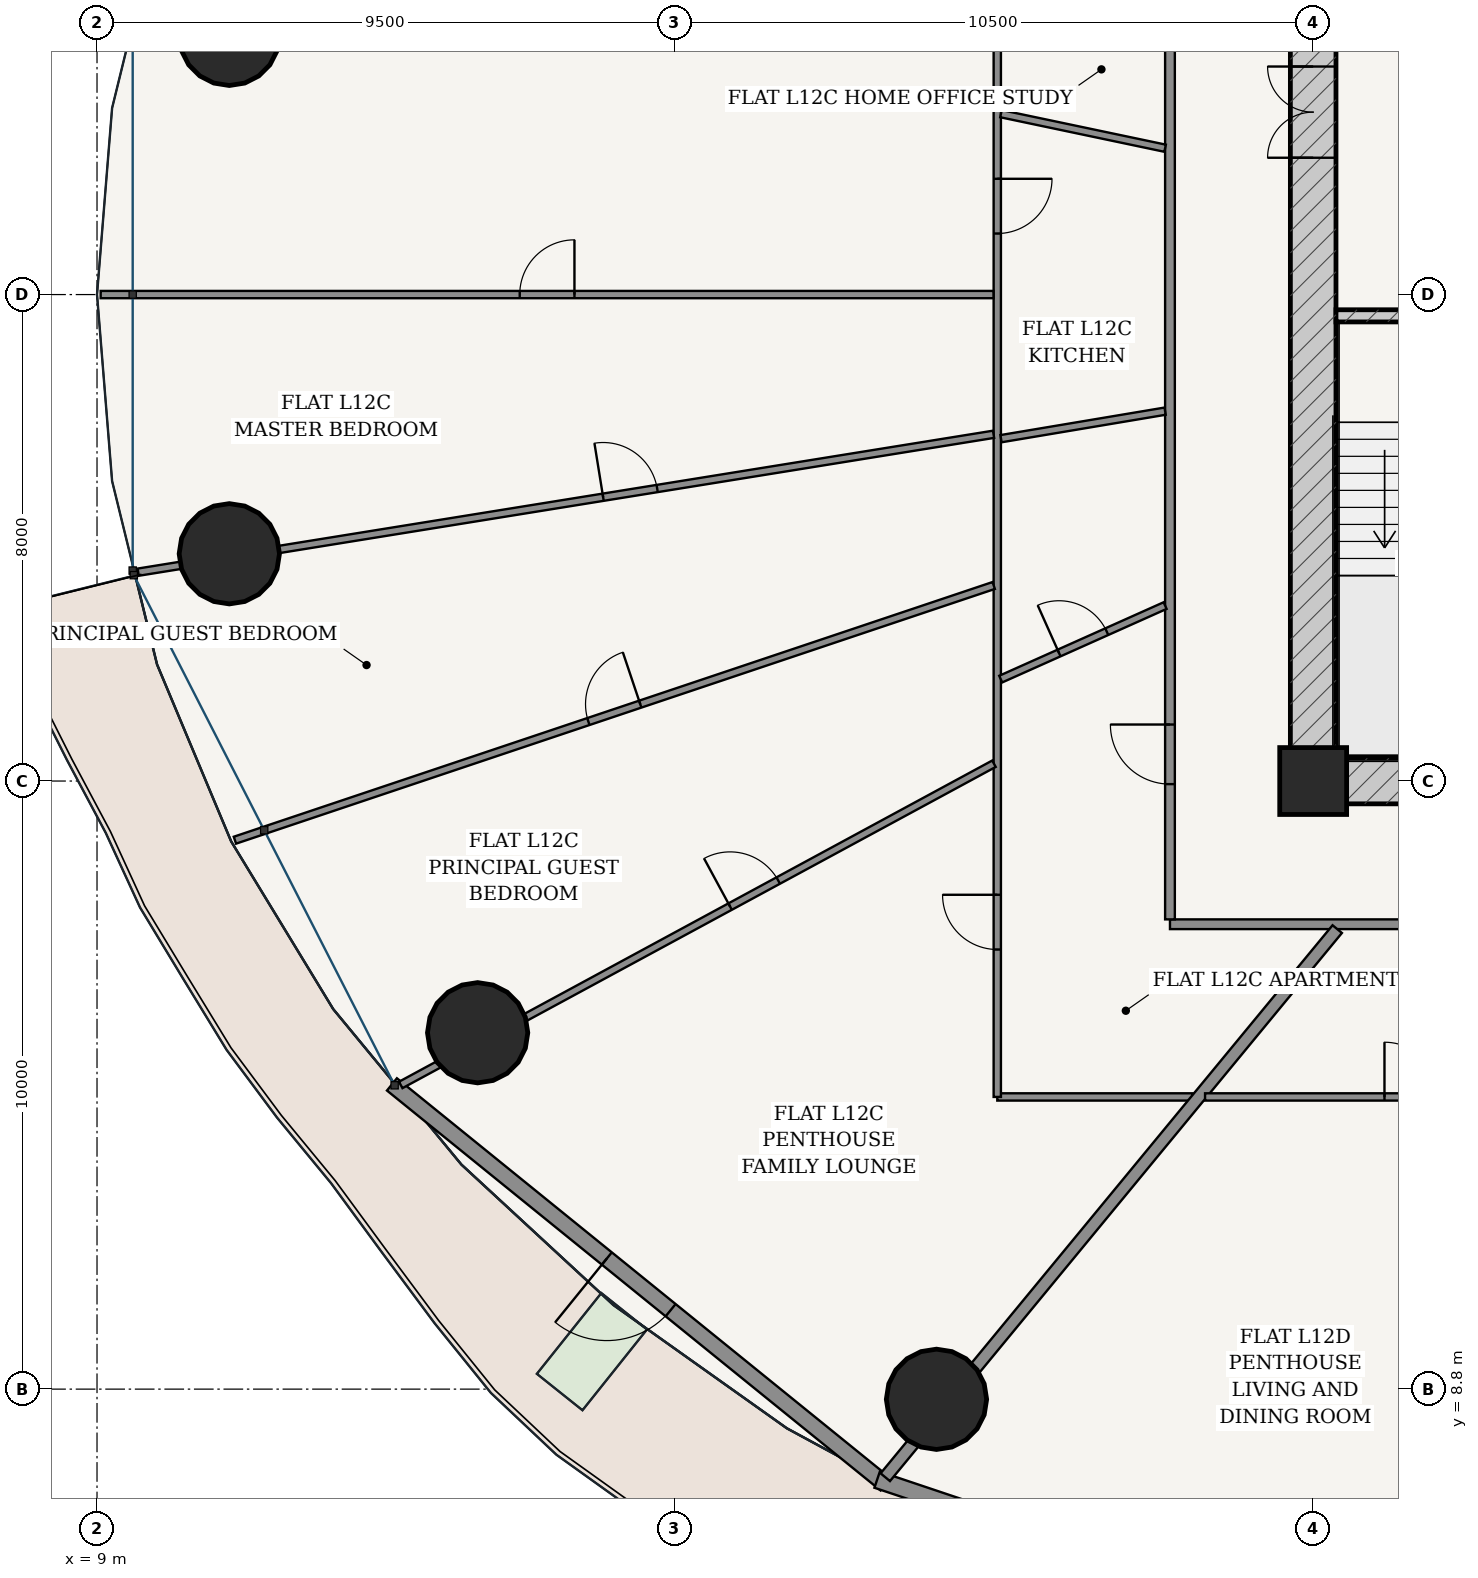
"""IFC4 building model, lengths in metres.
Left out: names, types, materials, properties, quantities, classifications, styles, units other than length and angle.
Written with IfcOpenShell. Run it as: python <this file> out.ifc"""

import sys

from ifc_helpers import new_model, si_unit, direction, frame, frame_2d, origin, origin_2d, place, context, subcontext, project, spatial, rectangle, hollow_circle, extrude, source, transform, mapped, element, fill, save


model = new_model("IFC4")
c1 = context("Model", 3, precision=1e-05, world=origin(), true_north=direction((-0.2419218956, 0.970295726276)))
c2 = subcontext(c1, "Body", "Model", "MODEL_VIEW")
j1 = project(units=[si_unit("LENGTHUNIT", "METRE"), si_unit("PLANEANGLEUNIT", "RADIAN")], contexts=[c1])
p1 = place(None, origin())
s1 = spatial("IfcSite", under=j1, at=p1, CompositionType="ELEMENT")
p2 = place(p1, origin())
s2 = spatial("IfcBuilding", under=s1, at=p2, CompositionType="ELEMENT")
p3 = place(p2, frame((0.0, 0.0, 49.2)))
s3 = spatial("IfcBuildingStorey", under=s2, at=p3, CompositionType="ELEMENT", Elevation=49.2)
p4 = place(p3, frame((29.0, 18.8, 0.0), z_axis=(0.0, 0.0, 1.0), x_axis=(1.0, 0.0, 0.0)))
e1 = element("IfcColumn", 1, at=p4, inside=s3, PredefinedType="COLUMN", context=c2, shape_type="SweptSolid", body=[
    extrude(rectangle(XDim=1.1, YDim=1.1, at=origin_2d()), origin(), (0.0, 0.0, 1.0), 3.6),
])
p5 = place(p3, frame((28.625, 18.8, 0.0), z_axis=(0.0, 0.0, 1.0), x_axis=(1.0, 0.0, 0.0)))
e2 = element("IfcWall", 2, at=p5, inside=s3, PredefinedType="SHEAR", context=c2, shape_type="SweptSolid", body=[
    extrude(rectangle(XDim=18.75, YDim=0.75, at=frame_2d((9.375, 0.0))), origin(), (0.0, 0.0, 1.0), 3.32),
])
p6 = place(p5, frame((7.627, 0.0, 0.0)))
e3 = element("IfcOpeningElement", 3, at=p6, cuts=e2, PredefinedType="OPENING", context=c2, shape_type="SweptSolid", body=[
    extrude(rectangle(XDim=0.85, YDim=2.1, at=frame_2d((0.425, 1.05))), frame((0.0, 0.385, 0.0), z_axis=(0.0, -1.0, 0.0), x_axis=(1.0, 0.0, 0.0)), (0.0, 0.0, 1.0), 0.77),
])
p7 = place(p5, frame((10.673, 0.0, 0.0)))
e4 = element("IfcOpeningElement", 4, at=p7, cuts=e2, PredefinedType="OPENING", context=c2, shape_type="SweptSolid", body=[
    extrude(rectangle(XDim=0.85, YDim=2.1, at=frame_2d((0.425, 1.05))), frame((0.0, 0.385, 0.0), z_axis=(0.0, -1.0, 0.0), x_axis=(1.0, 0.0, 0.0)), (0.0, 0.0, 1.0), 0.77),
])
p8 = place(p3, frame((29.0, 19.175, 0.0), z_axis=(0.0, 0.0, 1.0), x_axis=(0.0, 1.0, 0.0)))
e5 = element("IfcWall", 5, at=p8, inside=s3, PredefinedType="SHEAR", context=c2, shape_type="SweptSolid", body=[
    extrude(rectangle(XDim=15.25, YDim=0.75, at=frame_2d((7.625, 0.0))), origin(), (0.0, 0.0, 1.0), 3.32),
])
p9 = place(p8, frame((9.875, 0.0, 0.0)))
e6 = element("IfcOpeningElement", 6, at=p9, cuts=e5, PredefinedType="OPENING", context=c2, shape_type="SweptSolid", body=[
    extrude(rectangle(XDim=1.5, YDim=2.2, at=frame_2d((0.75, 1.1))), frame((0.0, 0.385, 0.0), z_axis=(0.0, -1.0, 0.0), x_axis=(1.0, 0.0, 0.0)), (0.0, 0.0, 1.0), 0.77),
])
p10 = place(p3, frame((29.375, 26.45, 0.0), z_axis=(0.0, 0.0, 1.0), x_axis=(1.0, 0.0, 0.0)))
e7 = element("IfcWall", 7, at=p10, inside=s3, PredefinedType="SOLIDWALL", context=c2, shape_type="SweptSolid", body=[
    extrude(rectangle(XDim=3.32, YDim=0.2, at=frame_2d((1.66, 0.0))), origin(), (0.0, 0.0, 1.0), 3.32),
])
p11 = place(p10, frame((1.185, 0.0, 0.0)))
e8 = element("IfcOpeningElement", 8, at=p11, cuts=e7, PredefinedType="OPENING", context=c2, shape_type="SweptSolid", body=[
    extrude(rectangle(XDim=0.95, YDim=2.15, at=frame_2d((0.475, 1.075))), frame((0.0, 0.11, 0.0), z_axis=(0.0, -1.0, 0.0), x_axis=(1.0, 0.0, 0.0)), (0.0, 0.0, 1.0), 0.22),
])
for number, where, z_axis, x_axis in (
    (9, (11.176, 31.063, 0.0), (0.0, 0.0, 1.0), (1.0, 0.0, 0.0)),
    (10, (11.176, 22.537, 0.0), (0.0, 0.0, 1.0), (1.0, 0.0, 0.0)),
    (11, (15.259, 14.661, 0.0), (0.0, 0.0, 1.0), (1.0, 0.0, 0.0)),
    (12, (22.805, 8.632, 0.0), (0.0, 0.0, 1.0), (1.0, 0.0, 0.0)),
):
    element("IfcColumn", number, at=place(p3, frame(where, z_axis=z_axis, x_axis=x_axis)), inside=s3, PredefinedType="COLUMN", context=c2, shape_type="SweptSolid", body=[
        extrude(hollow_circle(Radius=0.825, WallThickness=0.05, at=origin_2d()), origin(), (0.0, 0.0, 1.0), 3.6),
    ])
p12 = place(p3, frame((13.85, 13.811, 0.0), z_axis=(0.0, 0.0, 1.0), x_axis=(0.777016782851, -0.629479879875, 0.0)))
e13 = element("IfcWall", 13, at=p12, inside=s3, PredefinedType="SOLIDWALL", context=c2, shape_type="SweptSolid", body=[
    extrude(rectangle(XDim=10.447, YDim=0.26, at=frame_2d((5.223, 0.0))), origin(), (0.0, 0.0, 1.0), 3.32),
])
p13 = place(p12, frame((4.548, 0.0, 0.0)))
e14 = element("IfcOpeningElement", 14, at=p13, cuts=e13, PredefinedType="OPENING", context=c2, shape_type="SweptSolid", body=[
    extrude(rectangle(XDim=1.35, YDim=2.2, at=frame_2d((0.675, 1.1))), frame((0.0, 0.14, 0.0), z_axis=(0.0, -1.0, 0.0), x_axis=(1.0, 0.0, 0.0)), (0.0, 0.0, 1.0), 0.28),
])
p14 = place(p3, frame((21.829, 7.311, 0.0), z_axis=(0.0, 0.0, 1.0), x_axis=(0.948047847546, -0.31812777113, 0.0)))
e15 = element("IfcWall", 15, at=p14, inside=s3, PredefinedType="SOLIDWALL", context=c2, shape_type="SweptSolid", body=[
    extrude(rectangle(XDim=11.175, YDim=0.28, at=frame_2d((5.588, 0.0))), origin(), (0.0, 0.0, 1.0), 3.32),
])
p15 = place(p14, frame((1.967, 0.0, 0.85)))
e16 = element("IfcOpeningElement", 16, at=p15, cuts=e15, PredefinedType="OPENING", context=c2, shape_type="SweptSolid", body=[
    extrude(rectangle(XDim=2.1, YDim=1.95, at=frame_2d((1.05, 0.975))), frame((0.0, 0.15, 0.0), z_axis=(0.0, -1.0, 0.0), x_axis=(1.0, 0.0, 0.0)), (0.0, 0.0, 1.0), 0.3),
])
p16 = place(p14, frame((7.108, 0.0, 0.85)))
e17 = element("IfcOpeningElement", 17, at=p16, cuts=e15, PredefinedType="OPENING", context=c2, shape_type="SweptSolid", body=[
    extrude(rectangle(XDim=2.1, YDim=1.95, at=frame_2d((1.05, 0.975))), frame((0.0, 0.15, 0.0), z_axis=(0.0, -1.0, 0.0), x_axis=(1.0, 0.0, 0.0)), (0.0, 0.0, 1.0), 0.3),
])
p17 = place(p3, frame((26.645, 16.445, 0.0), z_axis=(0.0, 0.0, 1.0), x_axis=(1.0, 0.0, 0.0)))
e18 = element("IfcWall", 18, at=p17, inside=s3, PredefinedType="PARTITIONING", context=c2, shape_type="SweptSolid", body=[
    extrude(rectangle(XDim=22.71, YDim=0.16, at=frame_2d((11.355, 0.0))), origin(), (0.0, 0.0, 1.0), 2.688),
])
p18 = place(p17, frame((19.962, 0.0, 0.0)))
e19 = element("IfcOpeningElement", 19, at=p18, cuts=e18, PredefinedType="OPENING", context=c2, shape_type="SweptSolid", body=[
    extrude(rectangle(XDim=0.98, YDim=2.2, at=frame_2d((0.49, 1.1))), frame((0.0, 0.09, 0.0), z_axis=(0.0, -1.0, 0.0), x_axis=(1.0, 0.0, 0.0)), (0.0, 0.0, 1.0), 0.18),
])
p19 = place(p3, frame((26.645, 16.525, 0.0), z_axis=(0.0, 0.0, 1.0), x_axis=(0.0, 1.0, 0.0)))
e20 = element("IfcWall", 20, at=p19, inside=s3, PredefinedType="PARTITIONING", context=c2, shape_type="SweptSolid", body=[
    extrude(rectangle(XDim=20.55, YDim=0.16, at=frame_2d((10.275, 0.0))), origin(), (0.0, 0.0, 1.0), 2.688),
])
p20 = place(p19, frame((2.224, 0.0, 0.0)))
e21 = element("IfcOpeningElement", 21, at=p20, cuts=e20, PredefinedType="OPENING", context=c2, shape_type="SweptSolid", body=[
    extrude(rectangle(XDim=0.98, YDim=2.2, at=frame_2d((0.49, 1.1))), frame((0.0, 0.09, 0.0), z_axis=(0.0, -1.0, 0.0), x_axis=(1.0, 0.0, 0.0)), (0.0, 0.0, 1.0), 0.18),
])
p21 = place(p3, frame((27.018, 13.605, 0.0), z_axis=(0.0, 0.0, 1.0), x_axis=(-1.0, 0.0, 0.0)))
e22 = element("IfcWall", 22, at=p21, inside=s3, PredefinedType="PARTITIONING", context=c2, shape_type="SweptSolid", body=[
    extrude(rectangle(XDim=3.213, YDim=0.12, at=frame_2d((1.606, 0.0))), origin(), (0.0, 0.0, 1.0), 2.688),
])
p22 = place(p3, frame((23.805, 13.605, 0.0), z_axis=(0.0, 0.0, 1.0), x_axis=(0.0, 1.0, 0.0)))
e23 = element("IfcWall", 23, at=p22, inside=s3, PredefinedType="PARTITIONING", context=c2, shape_type="SweptSolid", body=[
    extrude(rectangle(XDim=20.779, YDim=0.12, at=frame_2d((10.39, 0.0))), origin(), (0.0, 0.0, 1.0), 2.688),
])
p23 = place(p22, frame((2.425, 0.0, 0.0)))
e24 = element("IfcOpeningElement", 24, at=p23, cuts=e23, PredefinedType="OPENING", context=c2, shape_type="SweptSolid", body=[
    extrude(rectangle(XDim=0.9, YDim=2.15, at=frame_2d((0.45, 1.075))), frame((0.0, 0.07, 0.0), z_axis=(0.0, -1.0, 0.0), x_axis=(1.0, 0.0, 0.0)), (0.0, 0.0, 1.0), 0.14),
])
p24 = place(p22, frame((14.199, 0.0, 0.0)))
e25 = element("IfcOpeningElement", 25, at=p24, cuts=e23, PredefinedType="OPENING", context=c2, shape_type="SweptSolid", body=[
    extrude(rectangle(XDim=0.9, YDim=2.15, at=frame_2d((0.45, 1.075))), frame((0.0, 0.07, 0.0), z_axis=(0.0, -1.0, 0.0), x_axis=(1.0, 0.0, 0.0)), (0.0, 0.0, 1.0), 0.14),
])
p25 = place(p22, frame((17.908, 0.0, 0.0)))
e26 = element("IfcOpeningElement", 26, at=p25, cuts=e23, PredefinedType="OPENING", context=c2, shape_type="SweptSolid", body=[
    extrude(rectangle(XDim=0.9, YDim=2.15, at=frame_2d((0.45, 1.075))), frame((0.0, 0.07, 0.0), z_axis=(0.0, -1.0, 0.0), x_axis=(1.0, 0.0, 0.0)), (0.0, 0.0, 1.0), 0.14),
])
p26 = place(p3, frame((23.743, 26.8, 0.0), z_axis=(0.0, 0.0, 1.0), x_axis=(-1.0, 0.0, 0.0)))
e27 = element("IfcWall", 27, at=p26, inside=s3, PredefinedType="PARTITIONING", context=c2, shape_type="SweptSolid", body=[
    extrude(rectangle(XDim=14.683, YDim=0.12, at=frame_2d((7.341, 0.0))), origin(), (0.0, 0.0, 1.0), 2.762),
])
p27 = place(p26, frame((6.892, 0.0, 0.0)))
e28 = element("IfcOpeningElement", 28, at=p27, cuts=e27, PredefinedType="OPENING", context=c2, shape_type="SweptSolid", body=[
    extrude(rectangle(XDim=0.9, YDim=2.15, at=frame_2d((0.45, 1.075))), frame((0.0, 0.07, 0.0), z_axis=(0.0, -1.0, 0.0), x_axis=(1.0, 0.0, 0.0)), (0.0, 0.0, 1.0), 0.14),
])
p28 = place(p3, frame((23.744, 24.502, 0.0), z_axis=(0.0, 0.0, 1.0), x_axis=(-0.987259708938, -0.159117149007, 0.0)))
e29 = element("IfcWall", 29, at=p28, inside=s3, PredefinedType="PARTITIONING", context=c2, shape_type="SweptSolid", body=[
    extrude(rectangle(XDim=14.248, YDim=0.12, at=frame_2d((7.124, 0.0))), origin(), (0.0, 0.0, 1.0), 2.688),
])
p29 = place(p28, frame((5.603, 0.0, 0.0)))
e30 = element("IfcOpeningElement", 30, at=p29, cuts=e29, PredefinedType="OPENING", context=c2, shape_type="SweptSolid", body=[
    extrude(rectangle(XDim=0.9, YDim=2.15, at=frame_2d((0.45, 1.075))), frame((0.0, 0.07, 0.0), z_axis=(0.0, -1.0, 0.0), x_axis=(1.0, 0.0, 0.0)), (0.0, 0.0, 1.0), 0.14),
])
p30 = place(p3, frame((23.746, 22.016, 0.0), z_axis=(0.0, 0.0, 1.0), x_axis=(-0.948022802246, -0.318202398516, 0.0)))
e31 = element("IfcWall", 31, at=p30, inside=s3, PredefinedType="PARTITIONING", context=c2, shape_type="SweptSolid", body=[
    extrude(rectangle(XDim=13.163, YDim=0.12, at=frame_2d((6.582, 0.0))), origin(), (0.0, 0.0, 1.0), 2.762),
])
p31 = place(p30, frame((6.131, 0.0, 0.0)))
e32 = element("IfcOpeningElement", 32, at=p31, cuts=e31, PredefinedType="OPENING", context=c2, shape_type="SweptSolid", body=[
    extrude(rectangle(XDim=0.9, YDim=2.15, at=frame_2d((0.45, 1.075))), frame((0.0, 0.07, 0.0), z_axis=(0.0, -1.0, 0.0), x_axis=(1.0, 0.0, 0.0)), (0.0, 0.0, 1.0), 0.14),
])
p32 = place(p3, frame((23.75, 19.084, 0.0), z_axis=(0.0, 0.0, 1.0), x_axis=(-0.879370672984, -0.476137815654, 0.0)))
e33 = element("IfcWall", 33, at=p32, inside=s3, PredefinedType="PARTITIONING", context=c2, shape_type="SweptSolid", body=[
    extrude(rectangle(XDim=11.094, YDim=0.12, at=frame_2d((5.547, 0.0))), origin(), (0.0, 0.0, 1.0), 2.688),
])
p33 = place(p32, frame((4.034, 0.0, 0.0)))
e34 = element("IfcOpeningElement", 34, at=p33, cuts=e33, PredefinedType="OPENING", context=c2, shape_type="SweptSolid", body=[
    extrude(rectangle(XDim=0.9, YDim=2.15, at=frame_2d((0.45, 1.075))), frame((0.0, 0.07, 0.0), z_axis=(0.0, -1.0, 0.0), x_axis=(1.0, 0.0, 0.0)), (0.0, 0.0, 1.0), 0.14),
])
p34 = place(p3, frame((26.565, 29.207, 0.0), z_axis=(0.0, 0.0, 1.0), x_axis=(-0.978560113768, 0.205961413236, 0.0)))
e35 = element("IfcWall", 35, at=p34, inside=s3, PredefinedType="PARTITIONING", context=c2, shape_type="SweptSolid", body=[
    extrude(rectangle(XDim=2.758, YDim=0.12, at=frame_2d((1.379, 0.0))), origin(), (0.0, 0.0, 1.0), 3.32),
])
p35 = place(p3, frame((26.565, 24.883, 0.0), z_axis=(0.0, 0.0, 1.0), x_axis=(-0.986224611599, -0.165411654596, 0.0)))
e36 = element("IfcWall", 36, at=p35, inside=s3, PredefinedType="PARTITIONING", context=c2, shape_type="SweptSolid", body=[
    extrude(rectangle(XDim=2.736, YDim=0.12, at=frame_2d((1.368, 0.0))), origin(), (0.0, 0.0, 1.0), 2.688),
])
p36 = place(p3, frame((26.565, 21.685, 0.0), z_axis=(0.0, 0.0, 1.0), x_axis=(-0.912840085104, -0.408317252914, 0.0)))
e37 = element("IfcWall", 37, at=p36, inside=s3, PredefinedType="PARTITIONING", context=c2, shape_type="SweptSolid", body=[
    extrude(rectangle(XDim=2.961, YDim=0.12, at=frame_2d((1.481, 0.0))), origin(), (0.0, 0.0, 1.0), 3.32),
])
p37 = place(p36, frame((1.051, 0.0, 0.0)))
e38 = element("IfcOpeningElement", 38, at=p37, cuts=e37, PredefinedType="OPENING", context=c2, shape_type="SweptSolid", body=[
    extrude(rectangle(XDim=0.86, YDim=2.15, at=frame_2d((0.43, 1.075))), frame((0.0, 0.07, 0.0), z_axis=(0.0, -1.0, 0.0), x_axis=(1.0, 0.0, 0.0)), (0.0, 0.0, 1.0), 0.14),
])
p38 = place(p3, frame((29.396, 16.365, 0.0), z_axis=(0.0, 0.0, 1.0), x_axis=(-0.636186165667, -0.771535587393, 0.0)))
e39 = element("IfcWall", 39, at=p38, inside=s3, PredefinedType="PARTITIONING", context=c2, shape_type="SweptSolid", body=[
    extrude(rectangle(XDim=11.683, YDim=0.2, at=frame_2d((5.842, 0.0))), origin(), (0.0, 0.0, 1.0), 2.688),
])
p39 = place(p3, frame((52.195, 13.605, 0.0), z_axis=(0.0, 0.0, 1.0), x_axis=(-1.0, 0.0, 0.0)))
e40 = element("IfcWall", 40, at=p39, inside=s3, PredefinedType="PARTITIONING", context=c2, shape_type="SweptSolid", body=[
    extrude(rectangle(XDim=24.973, YDim=0.12, at=frame_2d((12.487, 0.0))), origin(), (0.0, 0.0, 1.0), 2.688),
])
p40 = place(p39, frame((3.841, 0.0, 0.0)))
e41 = element("IfcOpeningElement", 41, at=p40, cuts=e40, PredefinedType="OPENING", context=c2, shape_type="SweptSolid", body=[
    extrude(rectangle(XDim=0.9, YDim=2.15, at=frame_2d((0.45, 1.075))), frame((0.0, 0.07, 0.0), z_axis=(0.0, -1.0, 0.0), x_axis=(1.0, 0.0, 0.0)), (0.0, 0.0, 1.0), 0.14),
])
p41 = place(p39, frame((15.819, 0.0, 0.0)))
e42 = element("IfcOpeningElement", 42, at=p41, cuts=e40, PredefinedType="OPENING", context=c2, shape_type="SweptSolid", body=[
    extrude(rectangle(XDim=0.9, YDim=2.15, at=frame_2d((0.45, 1.075))), frame((0.0, 0.07, 0.0), z_axis=(0.0, -1.0, 0.0), x_axis=(1.0, 0.0, 0.0)), (0.0, 0.0, 1.0), 0.14),
])
p42 = place(p39, frame((21.123, 0.0, 0.0)))
e43 = element("IfcOpeningElement", 43, at=p42, cuts=e40, PredefinedType="OPENING", context=c2, shape_type="SweptSolid", body=[
    extrude(rectangle(XDim=0.9, YDim=2.15, at=frame_2d((0.45, 1.075))), frame((0.0, 0.07, 0.0), z_axis=(0.0, -1.0, 0.0), x_axis=(1.0, 0.0, 0.0)), (0.0, 0.0, 1.0), 0.14),
])
m1 = source(origin(), c2, "Body", "SweptSolid", [
    extrude(rectangle(XDim=1.35, YDim=2.2, at=frame_2d((0.675, 1.1))), frame((0.0, 0.025, 0.0), z_axis=(0.0, -1.0, 0.0), x_axis=(1.0, 0.0, 0.0)), (0.0, 0.0, 1.0), 0.05),
])
p43 = place(p13, frame((1.35, 0.0, 0.0), z_axis=(0.0, 0.0, 1.0), x_axis=(-1.0, 0.0, 0.0)))
e44 = element("IfcDoor", 44, at=p43, inside=s3, OperationType="SINGLE_SWING_RIGHT", PredefinedType="DOOR", context=c2, shape_type="MappedRepresentation", body=[
    mapped(m1, transform((0.0, 0.0, 0.0), scale=1.0)),
])
fill(e14, e44)
m2 = source(origin(), c2, "Body", "SweptSolid", [
    extrude(rectangle(XDim=1.5, YDim=2.2, at=frame_2d((0.75, 1.1))), frame((0.0, 0.025, 0.0), z_axis=(0.0, -1.0, 0.0), x_axis=(1.0, 0.0, 0.0)), (0.0, 0.0, 1.0), 0.05),
])
p44 = place(p9, origin())
e45 = element("IfcDoor", 45, at=p44, inside=s3, OperationType="DOUBLE_DOOR_SINGLE_SWING", PredefinedType="DOOR", context=c2, shape_type="MappedRepresentation", body=[
    mapped(m2, transform((0.0, 0.0, 0.0), scale=1.0)),
])
fill(e6, e45)
m3 = source(origin(), c2, "Body", "SweptSolid", [
    extrude(rectangle(XDim=0.98, YDim=2.2, at=frame_2d((0.49, 1.1))), frame((0.0, 0.025, 0.0), z_axis=(0.0, -1.0, 0.0), x_axis=(1.0, 0.0, 0.0)), (0.0, 0.0, 1.0), 0.05),
])
p45 = place(p20, origin())
e46 = element("IfcDoor", 46, at=p45, inside=s3, OperationType="SINGLE_SWING_RIGHT", PredefinedType="DOOR", context=c2, shape_type="MappedRepresentation", body=[
    mapped(m3, transform((0.0, 0.0, 0.0), scale=1.0)),
])
fill(e21, e46)
m4 = source(origin(), c2, "Body", "SweptSolid", [
    extrude(rectangle(XDim=0.86, YDim=2.15, at=frame_2d((0.43, 1.075))), frame((0.0, 0.025, 0.0), z_axis=(0.0, -1.0, 0.0), x_axis=(1.0, 0.0, 0.0)), (0.0, 0.0, 1.0), 0.05),
])
p46 = place(p37, frame((0.86, 0.0, 0.0), z_axis=(0.0, 0.0, 1.0), x_axis=(-1.0, 0.0, 0.0)))
e47 = element("IfcDoor", 47, at=p46, inside=s3, OperationType="SINGLE_SWING_LEFT", PredefinedType="DOOR", context=c2, shape_type="MappedRepresentation", body=[
    mapped(m4, transform((0.0, 0.0, 0.0), scale=1.0)),
])
fill(e38, e47)
m5 = source(origin(), c2, "Body", "SweptSolid", [
    extrude(rectangle(XDim=0.9, YDim=2.15, at=frame_2d((0.45, 1.075))), frame((0.0, 0.025, 0.0), z_axis=(0.0, -1.0, 0.0), x_axis=(1.0, 0.0, 0.0)), (0.0, 0.0, 1.0), 0.05),
])
p47 = place(p23, origin())
e48 = element("IfcDoor", 48, at=p47, inside=s3, OperationType="SINGLE_SWING_RIGHT", PredefinedType="DOOR", context=c2, shape_type="MappedRepresentation", body=[
    mapped(m5, transform((0.0, 0.0, 0.0), scale=1.0)),
])
fill(e24, e48)
p48 = place(p33, frame((0.9, 0.0, 0.0), z_axis=(0.0, 0.0, 1.0), x_axis=(-1.0, 0.0, 0.0)))
e49 = element("IfcDoor", 49, at=p48, inside=s3, OperationType="SINGLE_SWING_LEFT", PredefinedType="DOOR", context=c2, shape_type="MappedRepresentation", body=[
    mapped(m5, transform((0.0, 0.0, 0.0), scale=1.0)),
])
fill(e34, e49)
p49 = place(p31, frame((0.9, 0.0, 0.0), z_axis=(0.0, 0.0, 1.0), x_axis=(-1.0, 0.0, 0.0)))
e50 = element("IfcDoor", 50, at=p49, inside=s3, OperationType="SINGLE_SWING_RIGHT", PredefinedType="DOOR", context=c2, shape_type="MappedRepresentation", body=[
    mapped(m5, transform((0.0, 0.0, 0.0), scale=1.0)),
])
fill(e32, e50)
p50 = place(p29, frame((0.9, 0.0, 0.0), z_axis=(0.0, 0.0, 1.0), x_axis=(-1.0, 0.0, 0.0)))
e51 = element("IfcDoor", 51, at=p50, inside=s3, OperationType="SINGLE_SWING_LEFT", PredefinedType="DOOR", context=c2, shape_type="MappedRepresentation", body=[
    mapped(m5, transform((0.0, 0.0, 0.0), scale=1.0)),
])
fill(e30, e51)
p51 = place(p27, frame((0.9, 0.0, 0.0), z_axis=(0.0, 0.0, 1.0), x_axis=(-1.0, 0.0, 0.0)))
e52 = element("IfcDoor", 52, at=p51, inside=s3, OperationType="SINGLE_SWING_RIGHT", PredefinedType="DOOR", context=c2, shape_type="MappedRepresentation", body=[
    mapped(m5, transform((0.0, 0.0, 0.0), scale=1.0)),
])
fill(e28, e52)
p52 = place(p24, frame((0.9, 0.0, 0.0), z_axis=(0.0, 0.0, 1.0), x_axis=(-1.0, 0.0, 0.0)))
e53 = element("IfcDoor", 53, at=p52, inside=s3, OperationType="SINGLE_SWING_LEFT", PredefinedType="DOOR", context=c2, shape_type="MappedRepresentation", body=[
    mapped(m5, transform((0.0, 0.0, 0.0), scale=1.0)),
])
fill(e25, e53)
p53 = place(p42, frame((0.9, 0.0, 0.0), z_axis=(0.0, 0.0, 1.0), x_axis=(-1.0, 0.0, 0.0)))
e54 = element("IfcDoor", 54, at=p53, inside=s3, OperationType="SINGLE_SWING_LEFT", PredefinedType="DOOR", context=c2, shape_type="MappedRepresentation", body=[
    mapped(m5, transform((0.0, 0.0, 0.0), scale=1.0)),
])
fill(e43, e54)
save(model, sys.argv[1])
